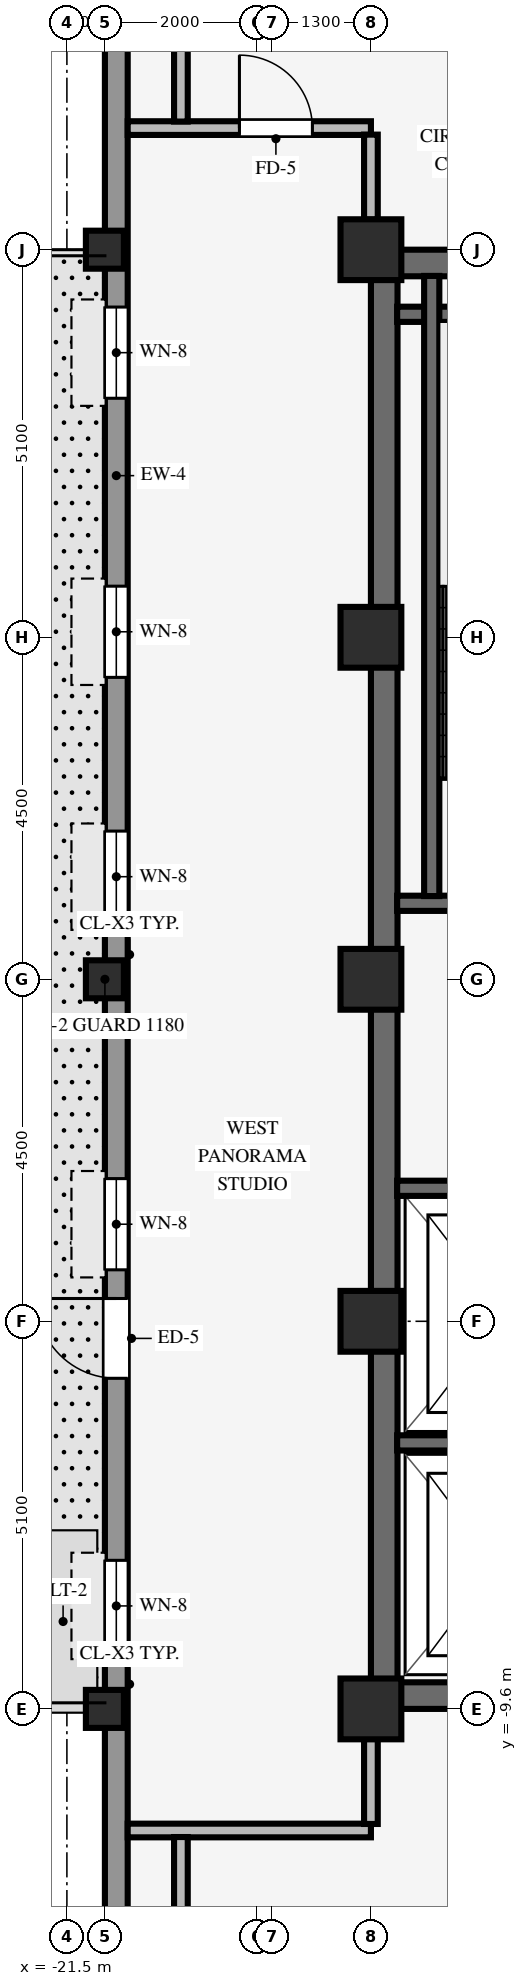
"""IFC4 building model, lengths in metres.
Left out: names, types, materials, properties, quantities, classifications, styles, units other than length and angle.
Written with IfcOpenShell. Run it as: python <this file> out.ifc"""

import sys

from ifc_helpers import new_model, si_unit, direction, frame, frame_2d, origin, origin_2d, place, context, subcontext, project, spatial, rectangle, hollow_rectangle, extrude, source, transform, mapped, element, fill, save


model = new_model("IFC4")
c1 = context("Model", 3, precision=1e-05, world=origin(), true_north=direction((0.0, 1.0)))
c2 = subcontext(c1, "Body", "Model", "MODEL_VIEW")
j1 = project(units=[si_unit("LENGTHUNIT", "METRE"), si_unit("PLANEANGLEUNIT", "RADIAN")], contexts=[c1])
p1 = place(None, origin())
s1 = spatial("IfcSite", under=j1, at=p1, CompositionType="ELEMENT")
p2 = place(p1, origin())
s2 = spatial("IfcBuilding", under=s1, at=p2, CompositionType="ELEMENT")
p3 = place(p2, frame((0.0, 0.0, 245.65)))
s3 = spatial("IfcBuildingStorey", under=s2, at=p3, CompositionType="ELEMENT", Elevation=245.65)
for number, where, z_axis, x_axis in (
    (1, (-17.5, -9.425, 0.0), (0.0, 0.0, 1.0), (1.0, 0.0, 0.0)),
    (2, (-17.5, 9.425, 0.0), (0.0, 0.0, 1.0), (1.0, 0.0, 0.0)),
):
    element("IfcWall", number, at=place(p3, frame(where, z_axis=z_axis, x_axis=x_axis)), inside=s3, PredefinedType="SHEAR", context=c2, shape_type="SweptSolid", body=[
        extrude(rectangle(XDim=8.5, YDim=0.35, at=frame_2d((4.25, 0.0))), origin(), (0.0, 0.0, 1.0), 3.37),
    ])
p4 = place(p3, frame((-17.325, -9.255, 0.0), z_axis=(0.0, 0.0, 1.0), x_axis=(0.0, 1.0, 0.0)))
e3 = element("IfcWall", 3, at=p4, inside=s3, PredefinedType="SHEAR", context=c2, shape_type="SweptSolid", body=[
    extrude(rectangle(XDim=18.51, YDim=0.35, at=frame_2d((9.255, 0.0))), origin(), (0.0, 0.0, 1.0), 3.37),
])
for number, where, z_axis, x_axis in (
    (4, (-17.5, -9.6, 0.0), (0.0, 0.0, 1.0), (1.0, 0.0, 0.0)),
    (5, (-17.5, -4.5, 0.0), (0.0, 0.0, 1.0), (1.0, 0.0, 0.0)),
    (6, (-17.5, 4.5, 0.0), (0.0, 0.0, 1.0), (1.0, 0.0, 0.0)),
    (7, (-17.5, 9.6, 0.0), (0.0, 0.0, 1.0), (1.0, 0.0, 0.0)),
    (8, (-17.5, 0.0, 0.0), (0.0, 0.0, 1.0), (1.0, 0.0, 0.0)),
):
    element("IfcColumn", number, at=place(p3, frame(where, z_axis=z_axis, x_axis=x_axis)), inside=s3, PredefinedType="COLUMN", context=c2, shape_type="SweptSolid", body=[
        extrude(rectangle(XDim=0.8, YDim=0.8, at=origin_2d()), origin(), (0.0, 0.0, 1.0), 3.37),
    ])
for number, where, z_axis, x_axis in (
    (9, (-21.0, -9.6, -0.4), (0.0, 0.0, 1.0), (1.0, 0.0, 0.0)),
    (10, (-21.0, 0.0, -0.4), (0.0, 0.0, 1.0), (1.0, 0.0, 0.0)),
    (11, (-21.0, 9.6, -0.4), (0.0, 0.0, 1.0), (1.0, 0.0, 0.0)),
):
    element("IfcColumn", number, at=place(p3, frame(where, z_axis=z_axis, x_axis=x_axis)), inside=s3, PredefinedType="COLUMN", context=c2, shape_type="SweptSolid", body=[
        extrude(hollow_rectangle(XDim=0.5, YDim=0.5, WallThickness=0.032, InnerFilletRadius=0.032, OuterFilletRadius=0.064, at=origin_2d()), origin(), (0.0, 0.0, 1.0), 3.77),
    ])
p5 = place(p3, frame((-20.85, -17.004, 0.0), z_axis=(0.0, 0.0, 1.0), x_axis=(0.0, 1.0, 0.0)))
e12 = element("IfcWall", 12, at=p5, inside=s3, PredefinedType="STANDARD", context=c2, shape_type="SweptSolid", body=[
    extrude(rectangle(XDim=34.008, YDim=0.3, at=frame_2d((17.004, 0.0))), origin(), (0.0, 0.0, 1.0), 2.705),
])
p6 = place(p5, frame((11.754, 0.0, 0.0)))
e13 = element("IfcOpeningElement", 13, at=p6, cuts=e12, PredefinedType="OPENING", context=c2, shape_type="SweptSolid", body=[
    extrude(rectangle(XDim=1.05, YDim=2.1, at=frame_2d((0.525, 1.05))), frame((0.0, 0.16, 0.0), z_axis=(0.0, -1.0, 0.0), x_axis=(1.0, 0.0, 0.0)), (0.0, 0.0, 1.0), 0.32),
])
p7 = place(p5, frame((1.786, 0.0, 0.8)))
e14 = element("IfcOpeningElement", 14, at=p7, cuts=e12, PredefinedType="OPENING", context=c2, shape_type="SweptSolid", body=[
    extrude(rectangle(XDim=1.2, YDim=1.48, at=frame_2d((0.6, 0.74))), frame((0.0, 0.16, 0.0), z_axis=(0.0, -1.0, 0.0), x_axis=(1.0, 0.0, 0.0)), (0.0, 0.0, 1.0), 0.32),
])
p8 = place(p5, frame((8.159, 0.0, 0.8)))
e15 = element("IfcOpeningElement", 15, at=p8, cuts=e12, PredefinedType="OPENING", context=c2, shape_type="SweptSolid", body=[
    extrude(rectangle(XDim=1.2, YDim=1.48, at=frame_2d((0.6, 0.74))), frame((0.0, 0.16, 0.0), z_axis=(0.0, -1.0, 0.0), x_axis=(1.0, 0.0, 0.0)), (0.0, 0.0, 1.0), 0.32),
])
p9 = place(p5, frame((13.181, 0.0, 0.8)))
e16 = element("IfcOpeningElement", 16, at=p9, cuts=e12, PredefinedType="OPENING", context=c2, shape_type="SweptSolid", body=[
    extrude(rectangle(XDim=1.2, YDim=1.48, at=frame_2d((0.6, 0.74))), frame((0.0, 0.16, 0.0), z_axis=(0.0, -1.0, 0.0), x_axis=(1.0, 0.0, 0.0)), (0.0, 0.0, 1.0), 0.32),
])
p10 = place(p5, frame((17.754, 0.0, 0.8)))
e17 = element("IfcOpeningElement", 17, at=p10, cuts=e12, PredefinedType="OPENING", context=c2, shape_type="SweptSolid", body=[
    extrude(rectangle(XDim=1.2, YDim=1.48, at=frame_2d((0.6, 0.74))), frame((0.0, 0.16, 0.0), z_axis=(0.0, -1.0, 0.0), x_axis=(1.0, 0.0, 0.0)), (0.0, 0.0, 1.0), 0.32),
])
p11 = place(p5, frame((20.977, 0.0, 0.8)))
e18 = element("IfcOpeningElement", 18, at=p11, cuts=e12, PredefinedType="OPENING", context=c2, shape_type="SweptSolid", body=[
    extrude(rectangle(XDim=1.2, YDim=1.48, at=frame_2d((0.6, 0.74))), frame((0.0, 0.16, 0.0), z_axis=(0.0, -1.0, 0.0), x_axis=(1.0, 0.0, 0.0)), (0.0, 0.0, 1.0), 0.32),
])
p12 = place(p5, frame((24.649, 0.0, 0.8)))
e19 = element("IfcOpeningElement", 19, at=p12, cuts=e12, PredefinedType="OPENING", context=c2, shape_type="SweptSolid", body=[
    extrude(rectangle(XDim=1.2, YDim=1.48, at=frame_2d((0.6, 0.74))), frame((0.0, 0.16, 0.0), z_axis=(0.0, -1.0, 0.0), x_axis=(1.0, 0.0, 0.0)), (0.0, 0.0, 1.0), 0.32),
])
p13 = place(p5, frame((31.022, 0.0, 0.8)))
e20 = element("IfcOpeningElement", 20, at=p13, cuts=e12, PredefinedType="OPENING", context=c2, shape_type="SweptSolid", body=[
    extrude(rectangle(XDim=1.2, YDim=1.48, at=frame_2d((0.6, 0.74))), frame((0.0, 0.16, 0.0), z_axis=(0.0, -1.0, 0.0), x_axis=(1.0, 0.0, 0.0)), (0.0, 0.0, 1.0), 0.32),
])
for number, where, z_axis, x_axis in (
    (21, (-17.155, 1.0, 0.0), (0.0, 0.0, 1.0), (1.0, 0.0, 0.0)),
    (22, (-17.155, 8.75, 0.0), (0.0, 0.0, 1.0), (1.0, 0.0, 0.0)),
):
    element("IfcWall", number, at=place(p3, frame(where, z_axis=z_axis, x_axis=x_axis)), inside=s3, PredefinedType="SHEAR", context=c2, shape_type="SweptSolid", body=[
        extrude(rectangle(XDim=3.62, YDim=0.2, at=frame_2d((1.81, 0.0))), origin(), (0.0, 0.0, 1.0), 3.37),
    ])
p14 = place(p3, frame((-16.7, 1.095, 0.0), z_axis=(0.0, 0.0, 1.0), x_axis=(0.0, 1.0, 0.0)))
e23 = element("IfcWall", 23, at=p14, inside=s3, PredefinedType="SHEAR", context=c2, shape_type="SweptSolid", body=[
    extrude(rectangle(XDim=8.16, YDim=0.2, at=frame_2d((4.08, 0.0))), origin(), (0.0, 0.0, 1.0), 3.37),
])
p15 = place(p3, frame((-17.155, -6.1, 0.0), z_axis=(0.0, 0.0, 1.0), x_axis=(1.0, 0.0, 0.0)))
e24 = element("IfcWall", 24, at=p15, inside=s3, PredefinedType="SHEAR", context=c2, shape_type="SweptSolid", body=[
    extrude(rectangle(XDim=2.905, YDim=0.2, at=frame_2d((1.453, 0.0))), origin(), (0.0, 0.0, 1.0), 3.37),
])
p16 = place(p3, frame((-17.155, -2.75, 0.0), z_axis=(0.0, 0.0, 1.0), x_axis=(1.0, 0.0, 0.0)))
e25 = element("IfcWall", 25, at=p16, inside=s3, PredefinedType="SHEAR", context=c2, shape_type="SweptSolid", body=[
    extrude(rectangle(XDim=2.71, YDim=0.2, at=frame_2d((1.355, 0.0))), origin(), (0.0, 0.0, 1.0), 3.37),
])
p17 = place(p3, frame((-20.7, -11.2, 0.0), z_axis=(0.0, 0.0, 1.0), x_axis=(1.0, 0.0, 0.0)))
e26 = element("IfcWall", 26, at=p17, inside=s3, PredefinedType="PARTITIONING", context=c2, shape_type="SweptSolid", body=[
    extrude(rectangle(XDim=3.2, YDim=0.18, at=frame_2d((1.6, 0.0))), origin(), (0.0, 0.0, 1.0), 3.36),
])
p18 = place(p3, frame((-20.7, 11.2, 0.0), z_axis=(0.0, 0.0, 1.0), x_axis=(1.0, 0.0, 0.0)))
e27 = element("IfcWall", 27, at=p18, inside=s3, PredefinedType="PARTITIONING", context=c2, shape_type="SweptSolid", body=[
    extrude(rectangle(XDim=3.2, YDim=0.18, at=frame_2d((1.6, 0.0))), origin(), (0.0, 0.0, 1.0), 3.36),
])
p19 = place(p18, frame((1.47, 0.0, 0.0)))
e28 = element("IfcOpeningElement", 28, at=p19, cuts=e27, PredefinedType="OPENING", context=c2, shape_type="SweptSolid", body=[
    extrude(rectangle(XDim=0.96, YDim=2.1, at=frame_2d((0.48, 1.05))), frame((0.0, 0.1, 0.0), z_axis=(0.0, -1.0, 0.0), x_axis=(1.0, 0.0, 0.0)), (0.0, 0.0, 1.0), 0.2),
])
for number, where, z_axis, x_axis in (
    (29, (-20.0, -13.514, 0.0), (0.0, 0.0, 1.0), (0.0, 1.0, 0.0)),
    (30, (-20.0, 11.286, 0.0), (0.0, 0.0, 1.0), (0.0, 1.0, 0.0)),
):
    element("IfcWall", number, at=place(p3, frame(where, z_axis=z_axis, x_axis=x_axis)), inside=s3, PredefinedType="PARTITIONING", context=c2, shape_type="SweptSolid", body=[
        extrude(rectangle(XDim=2.228, YDim=0.18, at=frame_2d((1.114, 0.0))), origin(), (0.0, 0.0, 1.0), 3.36),
    ])
for number, where, z_axis, x_axis in (
    (31, (-17.5, -11.114, 0.0), (0.0, 0.0, 1.0), (0.0, 1.0, 0.0)),
    (32, (-17.5, 9.996, 0.0), (0.0, 0.0, 1.0), (0.0, 1.0, 0.0)),
):
    element("IfcWall", number, at=place(p3, frame(where, z_axis=z_axis, x_axis=x_axis)), inside=s3, PredefinedType="PARTITIONING", context=c2, shape_type="SweptSolid", body=[
        extrude(rectangle(XDim=1.118, YDim=0.18, at=frame_2d((0.559, 0.0))), origin(), (0.0, 0.0, 1.0), 2.892),
    ])
m1 = source(origin(), c2, "Body", "SweptSolid", [
    extrude(rectangle(XDim=1.05, YDim=2.1, at=frame_2d((0.525, 1.05))), frame((0.0, 0.025, 0.0), z_axis=(0.0, -1.0, 0.0), x_axis=(1.0, 0.0, 0.0)), (0.0, 0.0, 1.0), 0.05),
])
p20 = place(p6, origin())
e33 = element("IfcDoor", 33, at=p20, inside=s3, OperationType="SINGLE_SWING_RIGHT", PredefinedType="DOOR", context=c2, shape_type="MappedRepresentation", body=[
    mapped(m1, transform((0.0, 0.0, 0.0), scale=1.0)),
])
fill(e13, e33)
m2 = source(origin(), c2, "Body", "SweptSolid", [
    extrude(rectangle(XDim=1.2, YDim=1.48, at=frame_2d((0.6, 0.74))), frame((0.0, 0.03, 0.0), z_axis=(0.0, -1.0, 0.0), x_axis=(1.0, 0.0, 0.0)), (0.0, 0.0, 1.0), 0.06),
])
p21 = place(p8, origin())
e34 = element("IfcWindow", 34, at=p21, inside=s3, PartitioningType="SINGLE_PANEL", PredefinedType="WINDOW", context=c2, shape_type="MappedRepresentation", body=[
    mapped(m2, transform((0.0, 0.0, 0.0), scale=1.0)),
])
fill(e15, e34)
p22 = place(p9, origin())
e35 = element("IfcWindow", 35, at=p22, inside=s3, PartitioningType="SINGLE_PANEL", PredefinedType="WINDOW", context=c2, shape_type="MappedRepresentation", body=[
    mapped(m2, transform((0.0, 0.0, 0.0), scale=1.0)),
])
fill(e16, e35)
p23 = place(p10, origin())
e36 = element("IfcWindow", 36, at=p23, inside=s3, PartitioningType="SINGLE_PANEL", PredefinedType="WINDOW", context=c2, shape_type="MappedRepresentation", body=[
    mapped(m2, transform((0.0, 0.0, 0.0), scale=1.0)),
])
fill(e17, e36)
p24 = place(p11, origin())
e37 = element("IfcWindow", 37, at=p24, inside=s3, PartitioningType="SINGLE_PANEL", PredefinedType="WINDOW", context=c2, shape_type="MappedRepresentation", body=[
    mapped(m2, transform((0.0, 0.0, 0.0), scale=1.0)),
])
fill(e18, e37)
p25 = place(p12, origin())
e38 = element("IfcWindow", 38, at=p25, inside=s3, PartitioningType="SINGLE_PANEL", PredefinedType="WINDOW", context=c2, shape_type="MappedRepresentation", body=[
    mapped(m2, transform((0.0, 0.0, 0.0), scale=1.0)),
])
fill(e19, e38)
m3 = source(origin(), c2, "Body", "SweptSolid", [
    extrude(rectangle(XDim=0.96, YDim=2.1, at=frame_2d((0.48, 1.05))), frame((0.0, 0.025, 0.0), z_axis=(0.0, -1.0, 0.0), x_axis=(1.0, 0.0, 0.0)), (0.0, 0.0, 1.0), 0.05),
])
p26 = place(p19, origin())
e39 = element("IfcDoor", 39, at=p26, inside=s3, OperationType="SINGLE_SWING_LEFT", PredefinedType="DOOR", context=c2, shape_type="MappedRepresentation", body=[
    mapped(m3, transform((0.0, 0.0, 0.0), scale=1.0)),
])
fill(e28, e39)
save(model, sys.argv[1])
